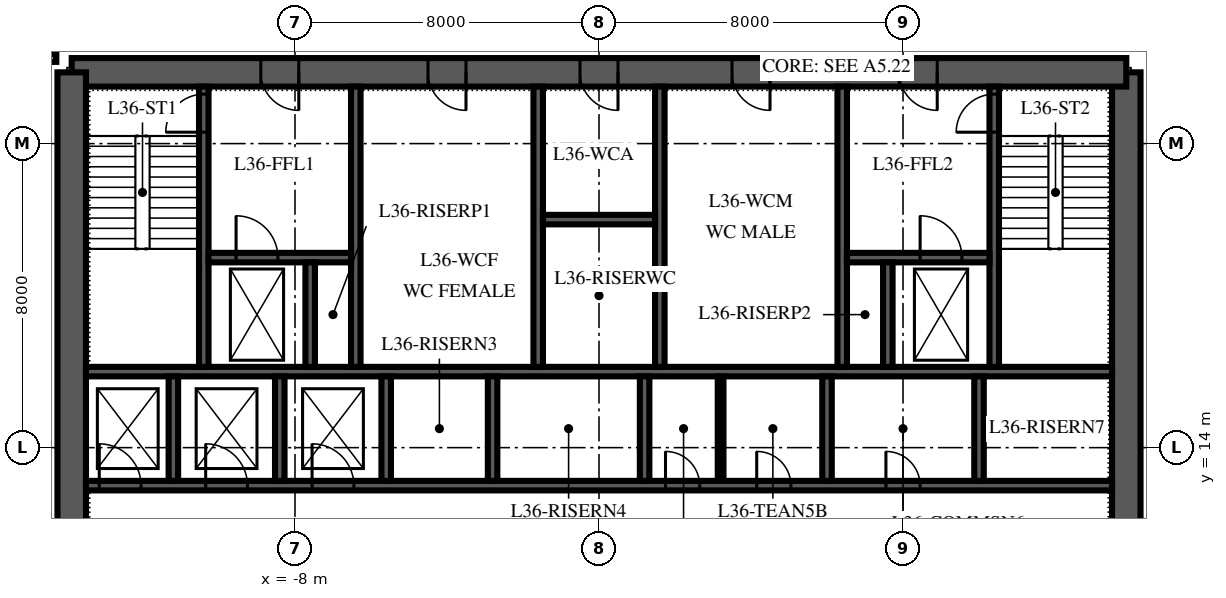
"""IFC4 building model, lengths in metres.
Left out: names, types, materials, properties, quantities, classifications, styles, units other than length and angle.
Written with IfcOpenShell. Run it as: python <this file> out.ifc"""

import sys

from ifc_helpers import new_model, si_unit, direction, frame, frame_2d, origin, place, context, subcontext, project, spatial, polyline, rectangle, outline, extrude, element, fill, save


model = new_model("IFC4")
c1 = context("Model", 3, precision=1e-05, world=origin(), true_north=direction((0.0, 1.0)))
c2 = subcontext(c1, "Body", "Model", "MODEL_VIEW")
j1 = project(units=[si_unit("LENGTHUNIT", "METRE"), si_unit("PLANEANGLEUNIT", "RADIAN")], contexts=[c1])
p1 = place(None, origin())
s1 = spatial("IfcSite", under=j1, at=p1, CompositionType="ELEMENT")
p2 = place(p1, origin())
s2 = spatial("IfcBuilding", under=s1, at=p2, CompositionType="ELEMENT")
p3 = place(p2, frame((0.0, 0.0, 159.0)))
s3 = spatial("IfcBuildingStorey", under=s2, at=p3, CompositionType="ELEMENT", Elevation=159.0)
p4 = place(p3, frame((13.875, 6.125, 0.0), z_axis=(0.0, 0.0, 1.0), x_axis=(0.0, 1.0, 0.0)))
e1 = element("IfcWall", 1, at=p4, inside=s3, PredefinedType="SHEAR", context=c2, shape_type="SweptSolid", body=[
    extrude(outline(polyline([(0.0, -0.375), (17.75, -0.375), (17.75, 0.0), (17.375, 0.0), (17.375, 0.375), (0.375, 0.375), (0.375, 0.0), (0.0, 0.0), (0.0, -0.375)])), origin(), (0.0, 0.0, 1.0), 4.0),
])
p5 = place(p4, frame((4.175, 0.0, 0.0)))
e2 = element("IfcOpeningElement", 2, at=p5, cuts=e1, PredefinedType="OPENING", context=c2, shape_type="SweptSolid", body=[
    extrude(rectangle(XDim=1.8, YDim=2.4, at=frame_2d((0.9, 1.2))), frame((0.0, 0.39, 0.0), z_axis=(0.0, -1.0, 0.0), x_axis=(1.0, 0.0, 0.0)), (0.0, 0.0, 1.0), 0.78),
])
p6 = place(p3, frame((13.875, 23.875, 0.0), z_axis=(0.0, 0.0, 1.0), x_axis=(-1.0, 0.0, 0.0)))
e3 = element("IfcWall", 3, at=p6, inside=s3, PredefinedType="SHEAR", context=c2, shape_type="SweptSolid", body=[
    extrude(rectangle(XDim=27.75, YDim=0.75, at=frame_2d((13.875, 0.0))), origin(), (0.0, 0.0, 1.0), 4.0),
])
p7 = place(p6, frame((21.775, 0.0, 0.0)))
e4 = element("IfcOpeningElement", 4, at=p7, cuts=e3, PredefinedType="OPENING", context=c2, shape_type="SweptSolid", body=[
    extrude(rectangle(XDim=1.0, YDim=2.1, at=frame_2d((0.5, 1.05))), frame((0.0, 0.39, 0.0), z_axis=(0.0, -1.0, 0.0), x_axis=(1.0, 0.0, 0.0)), (0.0, 0.0, 1.0), 0.78),
])
p8 = place(p6, frame((4.975, 0.0, 0.0)))
e5 = element("IfcOpeningElement", 5, at=p8, cuts=e3, PredefinedType="OPENING", context=c2, shape_type="SweptSolid", body=[
    extrude(rectangle(XDim=1.0, YDim=2.1, at=frame_2d((0.5, 1.05))), frame((0.0, 0.39, 0.0), z_axis=(0.0, -1.0, 0.0), x_axis=(1.0, 0.0, 0.0)), (0.0, 0.0, 1.0), 0.78),
])
p9 = place(p6, frame((17.375, 0.0, 0.0)))
e6 = element("IfcOpeningElement", 6, at=p9, cuts=e3, PredefinedType="OPENING", context=c2, shape_type="SweptSolid", body=[
    extrude(rectangle(XDim=1.0, YDim=2.1, at=frame_2d((0.5, 1.05))), frame((0.0, 0.39, 0.0), z_axis=(0.0, -1.0, 0.0), x_axis=(1.0, 0.0, 0.0)), (0.0, 0.0, 1.0), 0.78),
])
p10 = place(p6, frame((13.375, 0.0, 0.0)))
e7 = element("IfcOpeningElement", 7, at=p10, cuts=e3, PredefinedType="OPENING", context=c2, shape_type="SweptSolid", body=[
    extrude(rectangle(XDim=1.0, YDim=2.1, at=frame_2d((0.5, 1.05))), frame((0.0, 0.39, 0.0), z_axis=(0.0, -1.0, 0.0), x_axis=(1.0, 0.0, 0.0)), (0.0, 0.0, 1.0), 0.78),
])
p11 = place(p6, frame((9.375, 0.0, 0.0)))
e8 = element("IfcOpeningElement", 8, at=p11, cuts=e3, PredefinedType="OPENING", context=c2, shape_type="SweptSolid", body=[
    extrude(rectangle(XDim=1.0, YDim=2.1, at=frame_2d((0.5, 1.05))), frame((0.0, 0.39, 0.0), z_axis=(0.0, -1.0, 0.0), x_axis=(1.0, 0.0, 0.0)), (0.0, 0.0, 1.0), 0.78),
])
p12 = place(p3, frame((-13.875, 23.875, 0.0), z_axis=(0.0, 0.0, 1.0), x_axis=(0.0, -1.0, 0.0)))
e9 = element("IfcWall", 9, at=p12, inside=s3, PredefinedType="SHEAR", context=c2, shape_type="SweptSolid", body=[
    extrude(outline(polyline([(0.0, -0.375), (17.75, -0.375), (17.75, 0.0), (17.375, 0.0), (17.375, 0.375), (0.375, 0.375), (0.375, 0.0), (0.0, 0.0), (0.0, -0.375)])), origin(), (0.0, 0.0, 1.0), 4.0),
])
p13 = place(p12, frame((11.775, 0.0, 0.0)))
e10 = element("IfcOpeningElement", 10, at=p13, cuts=e9, PredefinedType="OPENING", context=c2, shape_type="SweptSolid", body=[
    extrude(rectangle(XDim=1.8, YDim=2.4, at=frame_2d((0.9, 1.2))), frame((0.0, 0.39, 0.0), z_axis=(0.0, -1.0, 0.0), x_axis=(1.0, 0.0, 0.0)), (0.0, 0.0, 1.0), 0.78),
])
p14 = place(p3, frame((-13.5, 13.0, 0.0), z_axis=(0.0, 0.0, 1.0), x_axis=(1.0, 0.0, 0.0)))
e11 = element("IfcWall", 11, at=p14, inside=s3, PredefinedType="SHEAR", context=c2, shape_type="SweptSolid", body=[
    extrude(rectangle(XDim=27.0, YDim=0.25, at=frame_2d((13.5, 0.0))), origin(), (0.0, 0.0, 1.0), 4.0),
])
p15 = place(p14, frame((0.35, 0.0, 0.0)))
e12 = element("IfcOpeningElement", 12, at=p15, cuts=e11, PredefinedType="OPENING", context=c2, shape_type="SweptSolid", body=[
    extrude(rectangle(XDim=1.1, YDim=2.1, at=frame_2d((0.55, 1.05))), frame((0.0, 0.14, 0.0), z_axis=(0.0, -1.0, 0.0), x_axis=(1.0, 0.0, 0.0)), (0.0, 0.0, 1.0), 0.28),
])
p16 = place(p14, frame((3.15, 0.0, 0.0)))
e13 = element("IfcOpeningElement", 13, at=p16, cuts=e11, PredefinedType="OPENING", context=c2, shape_type="SweptSolid", body=[
    extrude(rectangle(XDim=1.1, YDim=2.1, at=frame_2d((0.55, 1.05))), frame((0.0, 0.14, 0.0), z_axis=(0.0, -1.0, 0.0), x_axis=(1.0, 0.0, 0.0)), (0.0, 0.0, 1.0), 0.28),
])
p17 = place(p14, frame((5.95, 0.0, 0.0)))
e14 = element("IfcOpeningElement", 14, at=p17, cuts=e11, PredefinedType="OPENING", context=c2, shape_type="SweptSolid", body=[
    extrude(rectangle(XDim=1.1, YDim=2.1, at=frame_2d((0.55, 1.05))), frame((0.0, 0.14, 0.0), z_axis=(0.0, -1.0, 0.0), x_axis=(1.0, 0.0, 0.0)), (0.0, 0.0, 1.0), 0.28),
])
p18 = place(p14, frame((15.25, 0.0, 0.0)))
e15 = element("IfcOpeningElement", 15, at=p18, cuts=e11, PredefinedType="OPENING", context=c2, shape_type="SweptSolid", body=[
    extrude(rectangle(XDim=0.9, YDim=2.1, at=frame_2d((0.45, 1.05))), frame((0.0, 0.14, 0.0), z_axis=(0.0, -1.0, 0.0), x_axis=(1.0, 0.0, 0.0)), (0.0, 0.0, 1.0), 0.28),
])
p19 = place(p14, frame((17.65, 0.0, 0.0)))
e16 = element("IfcOpeningElement", 16, at=p19, cuts=e11, PredefinedType="OPENING", context=c2, shape_type="SweptSolid", body=[
    extrude(rectangle(XDim=0.9, YDim=2.1, at=frame_2d((0.45, 1.05))), frame((0.0, 0.14, 0.0), z_axis=(0.0, -1.0, 0.0), x_axis=(1.0, 0.0, 0.0)), (0.0, 0.0, 1.0), 0.28),
])
p20 = place(p14, frame((21.05, 0.0, 0.0)))
e17 = element("IfcOpeningElement", 17, at=p20, cuts=e11, PredefinedType="OPENING", context=c2, shape_type="SweptSolid", body=[
    extrude(rectangle(XDim=0.9, YDim=2.1, at=frame_2d((0.45, 1.05))), frame((0.0, 0.14, 0.0), z_axis=(0.0, -1.0, 0.0), x_axis=(1.0, 0.0, 0.0)), (0.0, 0.0, 1.0), 0.28),
])
p21 = place(p3, frame((-13.5, 16.0, 0.0), z_axis=(0.0, 0.0, 1.0), x_axis=(1.0, 0.0, 0.0)))
e18 = element("IfcWall", 18, at=p21, inside=s3, PredefinedType="SHEAR", context=c2, shape_type="SweptSolid", body=[
    extrude(rectangle(XDim=27.0, YDim=0.25, at=frame_2d((13.5, 0.0))), origin(), (0.0, 0.0, 1.0), 4.0),
])
for number, where, z_axis, x_axis in (
    (19, (-11.2, 13.125, 0.0), (0.0, 0.0, 1.0), (0.0, 1.0, 0.0)),
    (20, (-8.4, 13.125, 0.0), (0.0, 0.0, 1.0), (0.0, 1.0, 0.0)),
    (21, (-5.6, 13.125, 0.0), (0.0, 0.0, 1.0), (0.0, 1.0, 0.0)),
    (22, (-2.8, 13.125, 0.0), (0.0, 0.0, 1.0), (0.0, 1.0, 0.0)),
    (23, (1.2, 13.125, 0.0), (0.0, 0.0, 1.0), (0.0, 1.0, 0.0)),
    (24, (6.0, 13.125, 0.0), (0.0, 0.0, 1.0), (0.0, 1.0, 0.0)),
    (25, (10.0, 13.125, 0.0), (0.0, 0.0, 1.0), (0.0, 1.0, 0.0)),
):
    element("IfcWall", number, at=place(p3, frame(where, z_axis=z_axis, x_axis=x_axis)), inside=s3, PredefinedType="SHEAR", context=c2, shape_type="SweptSolid", body=[
        extrude(rectangle(XDim=2.75, YDim=0.25, at=frame_2d((1.375, 0.0))), origin(), (0.0, 0.0, 1.0), 4.0),
    ])
p22 = place(p3, frame((-10.4, 16.125, 0.0), z_axis=(0.0, 0.0, 1.0), x_axis=(0.0, 1.0, 0.0)))
e26 = element("IfcWall", 26, at=p22, inside=s3, PredefinedType="SHEAR", context=c2, shape_type="SweptSolid", body=[
    extrude(rectangle(XDim=7.375, YDim=0.25, at=frame_2d((3.688, 0.0))), origin(), (0.0, 0.0, 1.0), 4.0),
])
p23 = place(p22, frame((6.175, 0.0, 0.0)))
e27 = element("IfcOpeningElement", 27, at=p23, cuts=e26, PredefinedType="OPENING", context=c2, shape_type="SweptSolid", body=[
    extrude(rectangle(XDim=1.0, YDim=2.1, at=frame_2d((0.5, 1.05))), frame((0.0, 0.14, 0.0), z_axis=(0.0, -1.0, 0.0), x_axis=(1.0, 0.0, 0.0)), (0.0, 0.0, 1.0), 0.28),
])
for number, where, z_axis, x_axis in (
    (28, (-6.4, 16.125, 0.0), (0.0, 0.0, 1.0), (0.0, 1.0, 0.0)),
    (29, (-1.6, 16.125, 0.0), (0.0, 0.0, 1.0), (0.0, 1.0, 0.0)),
    (30, (1.6, 16.125, 0.0), (0.0, 0.0, 1.0), (0.0, 1.0, 0.0)),
    (31, (6.4, 16.125, 0.0), (0.0, 0.0, 1.0), (0.0, 1.0, 0.0)),
):
    element("IfcWall", number, at=place(p3, frame(where, z_axis=z_axis, x_axis=x_axis)), inside=s3, PredefinedType="SHEAR", context=c2, shape_type="SweptSolid", body=[
        extrude(rectangle(XDim=7.375, YDim=0.25, at=frame_2d((3.688, 0.0))), origin(), (0.0, 0.0, 1.0), 4.0),
    ])
p24 = place(p3, frame((10.4, 16.125, 0.0), z_axis=(0.0, 0.0, 1.0), x_axis=(0.0, 1.0, 0.0)))
e32 = element("IfcWall", 32, at=p24, inside=s3, PredefinedType="SHEAR", context=c2, shape_type="SweptSolid", body=[
    extrude(rectangle(XDim=7.375, YDim=0.25, at=frame_2d((3.688, 0.0))), origin(), (0.0, 0.0, 1.0), 4.0),
])
p25 = place(p24, frame((6.175, 0.0, 0.0)))
e33 = element("IfcOpeningElement", 33, at=p25, cuts=e32, PredefinedType="OPENING", context=c2, shape_type="SweptSolid", body=[
    extrude(rectangle(XDim=1.0, YDim=2.1, at=frame_2d((0.5, 1.05))), frame((0.0, 0.14, 0.0), z_axis=(0.0, -1.0, 0.0), x_axis=(1.0, 0.0, 0.0)), (0.0, 0.0, 1.0), 0.28),
])
p26 = place(p3, frame((-10.275, 19.0, 0.0), z_axis=(0.0, 0.0, 1.0), x_axis=(1.0, 0.0, 0.0)))
e34 = element("IfcWall", 34, at=p26, inside=s3, PredefinedType="SHEAR", context=c2, shape_type="SweptSolid", body=[
    extrude(rectangle(XDim=3.75, YDim=0.25, at=frame_2d((1.875, 0.0))), origin(), (0.0, 0.0, 1.0), 4.0),
])
p27 = place(p26, frame((0.725, 0.0, 0.0)))
e35 = element("IfcOpeningElement", 35, at=p27, cuts=e34, PredefinedType="OPENING", context=c2, shape_type="SweptSolid", body=[
    extrude(rectangle(XDim=1.1, YDim=2.1, at=frame_2d((0.55, 1.05))), frame((0.0, 0.14, 0.0), z_axis=(0.0, -1.0, 0.0), x_axis=(1.0, 0.0, 0.0)), (0.0, 0.0, 1.0), 0.28),
])
p28 = place(p3, frame((6.525, 19.0, 0.0), z_axis=(0.0, 0.0, 1.0), x_axis=(1.0, 0.0, 0.0)))
e36 = element("IfcWall", 36, at=p28, inside=s3, PredefinedType="SHEAR", context=c2, shape_type="SweptSolid", body=[
    extrude(rectangle(XDim=3.75, YDim=0.25, at=frame_2d((1.875, 0.0))), origin(), (0.0, 0.0, 1.0), 4.0),
])
p29 = place(p28, frame((1.925, 0.0, 0.0)))
e37 = element("IfcOpeningElement", 37, at=p29, cuts=e36, PredefinedType="OPENING", context=c2, shape_type="SweptSolid", body=[
    extrude(rectangle(XDim=1.1, YDim=2.1, at=frame_2d((0.55, 1.05))), frame((0.0, 0.14, 0.0), z_axis=(0.0, -1.0, 0.0), x_axis=(1.0, 0.0, 0.0)), (0.0, 0.0, 1.0), 0.28),
])
for number, where, z_axis, x_axis in (
    (38, (-7.6, 16.125, 0.0), (0.0, 0.0, 1.0), (0.0, 1.0, 0.0)),
    (39, (7.6, 16.125, 0.0), (0.0, 0.0, 1.0), (0.0, 1.0, 0.0)),
):
    element("IfcWall", number, at=place(p3, frame(where, z_axis=z_axis, x_axis=x_axis)), inside=s3, PredefinedType="SHEAR", context=c2, shape_type="SweptSolid", body=[
        extrude(rectangle(XDim=2.75, YDim=0.25, at=frame_2d((1.375, 0.0))), origin(), (0.0, 0.0, 1.0), 4.0),
    ])
p30 = place(p3, frame((-1.475, 20.0, 0.0), z_axis=(0.0, 0.0, 1.0), x_axis=(1.0, 0.0, 0.0)))
e40 = element("IfcWall", 40, at=p30, inside=s3, PredefinedType="SHEAR", context=c2, shape_type="SweptSolid", body=[
    extrude(rectangle(XDim=2.95, YDim=0.25, at=frame_2d((1.475, 0.0))), origin(), (0.0, 0.0, 1.0), 4.0),
])
p31 = place(p3, frame((3.2, 13.125, 0.0), z_axis=(0.0, 0.0, 1.0), x_axis=(0.0, 1.0, 0.0)))
e41 = element("IfcWall", 41, at=p31, inside=s3, PredefinedType="PARTITIONING", context=c2, shape_type="SweptSolid", body=[
    extrude(rectangle(XDim=2.75, YDim=0.15, at=frame_2d((1.375, 0.0))), origin(), (0.0, 0.0, 1.0), 3.85),
])
p32 = place(p3, frame((-16.1, 24.25, 0.0), z_axis=(0.0, 0.0, 1.0), x_axis=(1.0, 0.0, 0.0)))
e42 = element("IfcWall", 42, at=p32, inside=s3, PredefinedType="PARTITIONING", context=c2, shape_type="SweptSolid", body=[
    extrude(rectangle(XDim=1.82, YDim=0.2, at=frame_2d((0.91, 0.0))), origin(), (0.0, 0.0, 1.0), 3.4),
])
p33 = place(p7, origin())
e43 = element("IfcDoor", 43, at=p33, inside=s3, OperationType="SINGLE_SWING_RIGHT", PredefinedType="DOOR", context=c2, shape_type="SweptSolid", body=[
    extrude(rectangle(XDim=1.0, YDim=2.1, at=frame_2d((0.5, 1.05))), frame((0.0, 0.375, 0.0), z_axis=(0.0, -1.0, 0.0), x_axis=(1.0, 0.0, 0.0)), (0.0, 0.0, 1.0), 0.75),
])
fill(e4, e43)
p34 = place(p8, origin())
e44 = element("IfcDoor", 44, at=p34, inside=s3, OperationType="SINGLE_SWING_RIGHT", PredefinedType="DOOR", context=c2, shape_type="SweptSolid", body=[
    extrude(rectangle(XDim=1.0, YDim=2.1, at=frame_2d((0.5, 1.05))), frame((0.0, 0.375, 0.0), z_axis=(0.0, -1.0, 0.0), x_axis=(1.0, 0.0, 0.0)), (0.0, 0.0, 1.0), 0.75),
])
fill(e5, e44)
p35 = place(p9, origin())
e45 = element("IfcDoor", 45, at=p35, inside=s3, OperationType="SINGLE_SWING_LEFT", PredefinedType="DOOR", context=c2, shape_type="SweptSolid", body=[
    extrude(rectangle(XDim=1.0, YDim=2.1, at=frame_2d((0.5, 1.05))), frame((0.0, 0.375, 0.0), z_axis=(0.0, -1.0, 0.0), x_axis=(1.0, 0.0, 0.0)), (0.0, 0.0, 1.0), 0.75),
])
fill(e6, e45)
p36 = place(p10, origin())
e46 = element("IfcDoor", 46, at=p36, inside=s3, OperationType="SINGLE_SWING_LEFT", PredefinedType="DOOR", context=c2, shape_type="SweptSolid", body=[
    extrude(rectangle(XDim=1.0, YDim=2.1, at=frame_2d((0.5, 1.05))), frame((0.0, 0.375, 0.0), z_axis=(0.0, -1.0, 0.0), x_axis=(1.0, 0.0, 0.0)), (0.0, 0.0, 1.0), 0.75),
])
fill(e7, e46)
p37 = place(p11, origin())
e47 = element("IfcDoor", 47, at=p37, inside=s3, OperationType="SINGLE_SWING_LEFT", PredefinedType="DOOR", context=c2, shape_type="SweptSolid", body=[
    extrude(rectangle(XDim=1.0, YDim=2.1, at=frame_2d((0.5, 1.05))), frame((0.0, 0.375, 0.0), z_axis=(0.0, -1.0, 0.0), x_axis=(1.0, 0.0, 0.0)), (0.0, 0.0, 1.0), 0.75),
])
fill(e8, e47)
p38 = place(p23, origin())
e48 = element("IfcDoor", 48, at=p38, inside=s3, OperationType="SINGLE_SWING_LEFT", PredefinedType="DOOR", context=c2, shape_type="SweptSolid", body=[
    extrude(rectangle(XDim=1.0, YDim=2.1, at=frame_2d((0.5, 1.05))), frame((0.0, 0.125, 0.0), z_axis=(0.0, -1.0, 0.0), x_axis=(1.0, 0.0, 0.0)), (0.0, 0.0, 1.0), 0.25),
])
fill(e27, e48)
p39 = place(p25, origin())
e49 = element("IfcDoor", 49, at=p39, inside=s3, OperationType="SINGLE_SWING_LEFT", PredefinedType="DOOR", context=c2, shape_type="SweptSolid", body=[
    extrude(rectangle(XDim=1.0, YDim=2.1, at=frame_2d((0.5, 1.05))), frame((0.0, 0.125, 0.0), z_axis=(0.0, -1.0, 0.0), x_axis=(1.0, 0.0, 0.0)), (0.0, 0.0, 1.0), 0.25),
])
fill(e33, e49)
p40 = place(p15, origin())
e50 = element("IfcDoor", 50, at=p40, inside=s3, OperationType="SLIDING_TO_LEFT", PredefinedType="DOOR", context=c2, shape_type="SweptSolid", body=[
    extrude(rectangle(XDim=1.1, YDim=2.1, at=frame_2d((0.55, 1.05))), frame((0.0, 0.125, 0.0), z_axis=(0.0, -1.0, 0.0), x_axis=(1.0, 0.0, 0.0)), (0.0, 0.0, 1.0), 0.25),
])
fill(e12, e50)
p41 = place(p16, origin())
e51 = element("IfcDoor", 51, at=p41, inside=s3, OperationType="SLIDING_TO_LEFT", PredefinedType="DOOR", context=c2, shape_type="SweptSolid", body=[
    extrude(rectangle(XDim=1.1, YDim=2.1, at=frame_2d((0.55, 1.05))), frame((0.0, 0.125, 0.0), z_axis=(0.0, -1.0, 0.0), x_axis=(1.0, 0.0, 0.0)), (0.0, 0.0, 1.0), 0.25),
])
fill(e13, e51)
p42 = place(p17, origin())
e52 = element("IfcDoor", 52, at=p42, inside=s3, OperationType="SLIDING_TO_LEFT", PredefinedType="DOOR", context=c2, shape_type="SweptSolid", body=[
    extrude(rectangle(XDim=1.1, YDim=2.1, at=frame_2d((0.55, 1.05))), frame((0.0, 0.125, 0.0), z_axis=(0.0, -1.0, 0.0), x_axis=(1.0, 0.0, 0.0)), (0.0, 0.0, 1.0), 0.25),
])
fill(e14, e52)
p43 = place(p29, origin())
e53 = element("IfcDoor", 53, at=p43, inside=s3, OperationType="SLIDING_TO_RIGHT", PredefinedType="DOOR", context=c2, shape_type="SweptSolid", body=[
    extrude(rectangle(XDim=1.1, YDim=2.1, at=frame_2d((0.55, 1.05))), frame((0.0, 0.125, 0.0), z_axis=(0.0, -1.0, 0.0), x_axis=(1.0, 0.0, 0.0)), (0.0, 0.0, 1.0), 0.25),
])
fill(e37, e53)
p44 = place(p27, origin())
e54 = element("IfcDoor", 54, at=p44, inside=s3, OperationType="SLIDING_TO_RIGHT", PredefinedType="DOOR", context=c2, shape_type="SweptSolid", body=[
    extrude(rectangle(XDim=1.1, YDim=2.1, at=frame_2d((0.55, 1.05))), frame((0.0, 0.125, 0.0), z_axis=(0.0, -1.0, 0.0), x_axis=(1.0, 0.0, 0.0)), (0.0, 0.0, 1.0), 0.25),
])
fill(e35, e54)
p45 = place(p18, origin())
e55 = element("IfcDoor", 55, at=p45, inside=s3, OperationType="SINGLE_SWING_LEFT", PredefinedType="DOOR", context=c2, shape_type="SweptSolid", body=[
    extrude(rectangle(XDim=0.9, YDim=2.1, at=frame_2d((0.45, 1.05))), frame((0.0, 0.125, 0.0), z_axis=(0.0, -1.0, 0.0), x_axis=(1.0, 0.0, 0.0)), (0.0, 0.0, 1.0), 0.25),
])
fill(e15, e55)
p46 = place(p19, origin())
e56 = element("IfcDoor", 56, at=p46, inside=s3, OperationType="SINGLE_SWING_LEFT", PredefinedType="DOOR", context=c2, shape_type="SweptSolid", body=[
    extrude(rectangle(XDim=0.9, YDim=2.1, at=frame_2d((0.45, 1.05))), frame((0.0, 0.125, 0.0), z_axis=(0.0, -1.0, 0.0), x_axis=(1.0, 0.0, 0.0)), (0.0, 0.0, 1.0), 0.25),
])
fill(e16, e56)
p47 = place(p20, origin())
e57 = element("IfcDoor", 57, at=p47, inside=s3, OperationType="SINGLE_SWING_LEFT", PredefinedType="DOOR", context=c2, shape_type="SweptSolid", body=[
    extrude(rectangle(XDim=0.9, YDim=2.1, at=frame_2d((0.45, 1.05))), frame((0.0, 0.125, 0.0), z_axis=(0.0, -1.0, 0.0), x_axis=(1.0, 0.0, 0.0)), (0.0, 0.0, 1.0), 0.25),
])
fill(e17, e57)
save(model, sys.argv[1])
